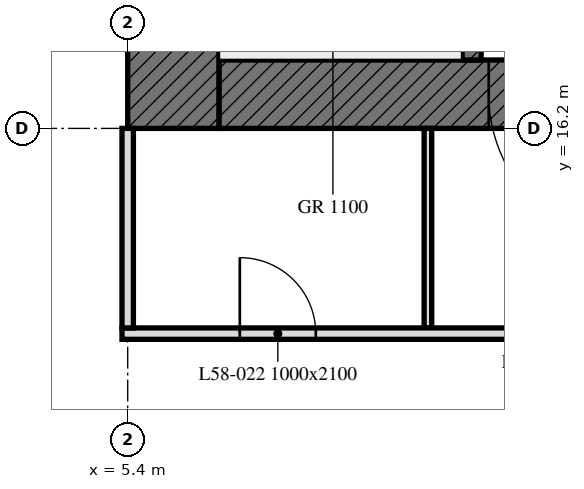
"""IFC4 building model, lengths in metres.
Left out: names, types, materials, properties, quantities, classifications, styles, units other than length and angle.
Written with IfcOpenShell. Run it as: python <this file> out.ifc"""

import sys

from ifc_helpers import new_model, si_unit, direction, frame, frame_2d, origin, place, context, subcontext, project, spatial, rectangle, extrude, element, fill, save


model = new_model("IFC4")
c1 = context("Model", 3, precision=1e-05, world=origin(), true_north=direction((0.0, 1.0)))
c2 = subcontext(c1, "Body", "Model", "MODEL_VIEW")
j1 = project(units=[si_unit("LENGTHUNIT", "METRE"), si_unit("PLANEANGLEUNIT", "RADIAN")], contexts=[c1])
p1 = place(None, origin())
s1 = spatial("IfcSite", under=j1, at=p1, CompositionType="ELEMENT")
p2 = place(p1, origin())
s2 = spatial("IfcBuilding", under=s1, at=p2, CompositionType="ELEMENT")
p3 = place(p2, frame((0.0, 0.0, 230.2)))
s3 = spatial("IfcBuildingStorey", under=s2, at=p3, CompositionType="ELEMENT", Elevation=230.2)
p4 = place(p3, frame((17.7, 16.65, 0.0), z_axis=(0.0, 0.0, 1.0), x_axis=(-1.0, 0.0, 0.0)))
e1 = element("IfcWall", 1, at=p4, inside=s3, PredefinedType="SOLIDWALL", context=c2, shape_type="SweptSolid", body=[
    extrude(rectangle(XDim=11.1, YDim=0.9, at=frame_2d((5.55, 0.0))), origin(), (0.0, 0.0, 1.0), 2.8),
])
p5 = place(p4, frame((5.55, 0.0, 0.0)))
e2 = element("IfcOpeningElement", 2, at=p5, cuts=e1, PredefinedType="OPENING", context=c2, shape_type="SweptSolid", body=[
    extrude(rectangle(XDim=2.0, YDim=2.4, at=frame_2d((1.0, 1.2))), frame((0.0, 0.45, 0.0), z_axis=(0.0, -1.0, 0.0), x_axis=(1.0, 0.0, 0.0)), (0.0, 0.0, 1.0), 0.9),
])
p6 = place(p3, frame((6.0, 16.2, 0.0), z_axis=(0.0, 0.0, 1.0), x_axis=(0.0, 1.0, 0.0)))
e3 = element("IfcWall", 3, at=p6, inside=s3, PredefinedType="SOLIDWALL", context=c2, shape_type="SweptSolid", body=[
    extrude(rectangle(XDim=16.2, YDim=1.2, at=frame_2d((8.1, 0.0))), origin(), (0.0, 0.0, 1.0), 2.8),
])
p7 = place(p3, frame((9.925, 17.1, 0.0), z_axis=(0.0, 0.0, 1.0), x_axis=(0.0, 1.0, 0.0)))
e4 = element("IfcWall", 4, at=p7, inside=s3, PredefinedType="SOLIDWALL", context=c2, shape_type="SweptSolid", body=[
    extrude(rectangle(XDim=14.4, YDim=0.25, at=frame_2d((7.2, 0.0))), origin(), (0.0, 0.0, 1.0), 2.8),
])
p8 = place(p7, frame((4.6, 0.0, 0.0)))
e5 = element("IfcOpeningElement", 5, at=p8, cuts=e4, PredefinedType="OPENING", context=c2, shape_type="SweptSolid", body=[
    extrude(rectangle(XDim=1.0, YDim=2.1, at=frame_2d((0.5, 1.05))), frame((0.0, 0.125, 0.0), z_axis=(0.0, -1.0, 0.0), x_axis=(1.0, 0.0, 0.0)), (0.0, 0.0, 1.0), 0.25),
])
p9 = place(p7, frame((7.062, 0.0, 0.0)))
e6 = element("IfcOpeningElement", 6, at=p9, cuts=e4, PredefinedType="OPENING", context=c2, shape_type="SweptSolid", body=[
    extrude(rectangle(XDim=1.2, YDim=2.1, at=frame_2d((0.6, 1.05))), frame((0.0, 0.125, 0.0), z_axis=(0.0, -1.0, 0.0), x_axis=(1.0, 0.0, 0.0)), (0.0, 0.0, 1.0), 0.25),
])
p10 = place(p7, frame((10.106, 0.0, 0.0)))
e7 = element("IfcOpeningElement", 7, at=p10, cuts=e4, PredefinedType="OPENING", context=c2, shape_type="SweptSolid", body=[
    extrude(rectangle(XDim=0.9, YDim=2.1, at=frame_2d((0.45, 1.05))), frame((0.0, 0.125, 0.0), z_axis=(0.0, -1.0, 0.0), x_axis=(1.0, 0.0, 0.0)), (0.0, 0.0, 1.0), 0.25),
])
p11 = place(p7, frame((12.048, 0.0, 0.0)))
e8 = element("IfcOpeningElement", 8, at=p11, cuts=e4, PredefinedType="OPENING", context=c2, shape_type="SweptSolid", body=[
    extrude(rectangle(XDim=0.9, YDim=2.1, at=frame_2d((0.45, 1.05))), frame((0.0, 0.125, 0.0), z_axis=(0.0, -1.0, 0.0), x_axis=(1.0, 0.0, 0.0)), (0.0, 0.0, 1.0), 0.25),
])
p12 = place(p7, frame((13.354, 0.0, 0.0)))
e9 = element("IfcOpeningElement", 9, at=p12, cuts=e4, PredefinedType="OPENING", context=c2, shape_type="SweptSolid", body=[
    extrude(rectangle(XDim=0.9, YDim=2.1, at=frame_2d((0.45, 1.05))), frame((0.0, 0.125, 0.0), z_axis=(0.0, -1.0, 0.0), x_axis=(1.0, 0.0, 0.0)), (0.0, 0.0, 1.0), 0.25),
])
p13 = place(p3, frame((9.35, 16.2, 0.0), z_axis=(0.0, 0.0, 1.0), x_axis=(0.0, -1.0, 0.0)))
e10 = element("IfcWall", 10, at=p13, inside=s3, PredefinedType="PARTITIONING", context=c2, shape_type="SweptSolid", body=[
    extrude(rectangle(XDim=2.625, YDim=0.1, at=frame_2d((1.312, 0.0))), origin(), (0.0, 0.0, 1.0), 2.8),
])
p14 = place(p3, frame((5.325, 13.5, 0.0), z_axis=(0.0, 0.0, 1.0), x_axis=(1.0, 0.0, 0.0)))
e11 = element("IfcWall", 11, at=p14, inside=s3, PredefinedType="PARTITIONING", context=c2, shape_type="SweptSolid", body=[
    extrude(rectangle(XDim=37.124, YDim=0.15, at=frame_2d((18.562, 0.0))), origin(), (0.0, 0.0, 1.0), 2.2),
])
p15 = place(p14, frame((18.475, 0.0, 0.0)))
e12 = element("IfcOpeningElement", 12, at=p15, cuts=e11, PredefinedType="OPENING", context=c2, shape_type="SweptSolid", body=[
    extrude(rectangle(XDim=1.0, YDim=2.1, at=frame_2d((0.5, 1.05))), frame((0.0, 0.075, 0.0), z_axis=(0.0, -1.0, 0.0), x_axis=(1.0, 0.0, 0.0)), (0.0, 0.0, 1.0), 0.15),
])
p16 = place(p14, frame((34.095, 0.0, 0.0)))
e13 = element("IfcOpeningElement", 13, at=p16, cuts=e11, PredefinedType="OPENING", context=c2, shape_type="SweptSolid", body=[
    extrude(rectangle(XDim=1.0, YDim=2.1, at=frame_2d((0.5, 1.05))), frame((0.0, 0.075, 0.0), z_axis=(0.0, -1.0, 0.0), x_axis=(1.0, 0.0, 0.0)), (0.0, 0.0, 1.0), 0.15),
])
p17 = place(p14, frame((8.75, 0.0, 0.0)))
e14 = element("IfcOpeningElement", 14, at=p17, cuts=e11, PredefinedType="OPENING", context=c2, shape_type="SweptSolid", body=[
    extrude(rectangle(XDim=1.0, YDim=2.1, at=frame_2d((0.5, 1.05))), frame((0.0, 0.075, 0.0), z_axis=(0.0, -1.0, 0.0), x_axis=(1.0, 0.0, 0.0)), (0.0, 0.0, 1.0), 0.15),
])
p18 = place(p14, frame((1.55, 0.0, 0.0)))
e15 = element("IfcOpeningElement", 15, at=p18, cuts=e11, PredefinedType="OPENING", context=c2, shape_type="SweptSolid", body=[
    extrude(rectangle(XDim=1.0, YDim=2.1, at=frame_2d((0.5, 1.05))), frame((0.0, 0.075, 0.0), z_axis=(0.0, -1.0, 0.0), x_axis=(1.0, 0.0, 0.0)), (0.0, 0.0, 1.0), 0.15),
])
p19 = place(p14, frame((28.2, 0.0, 0.0)))
e16 = element("IfcOpeningElement", 16, at=p19, cuts=e11, PredefinedType="OPENING", context=c2, shape_type="SweptSolid", body=[
    extrude(rectangle(XDim=1.0, YDim=2.1, at=frame_2d((0.5, 1.05))), frame((0.0, 0.075, 0.0), z_axis=(0.0, -1.0, 0.0), x_axis=(1.0, 0.0, 0.0)), (0.0, 0.0, 1.0), 0.15),
])
p20 = place(p14, frame((30.625, 0.0, 0.0)))
e17 = element("IfcOpeningElement", 17, at=p20, cuts=e11, PredefinedType="OPENING", context=c2, shape_type="SweptSolid", body=[
    extrude(rectangle(XDim=1.8, YDim=2.4, at=frame_2d((0.9, 1.2))), frame((0.0, 0.075, 0.0), z_axis=(0.0, -1.0, 0.0), x_axis=(1.0, 0.0, 0.0)), (0.0, 0.0, 1.0), 0.15),
])
p21 = place(p14, frame((5.925, 0.0, 0.0)))
e18 = element("IfcOpeningElement", 18, at=p21, cuts=e11, PredefinedType="OPENING", context=c2, shape_type="SweptSolid", body=[
    extrude(rectangle(XDim=1.0, YDim=2.1, at=frame_2d((0.5, 1.05))), frame((0.0, 0.075, 0.0), z_axis=(0.0, -1.0, 0.0), x_axis=(1.0, 0.0, 0.0)), (0.0, 0.0, 1.0), 0.15),
])
p22 = place(p3, frame((5.4, 13.575, 0.0), z_axis=(0.0, 0.0, 1.0), x_axis=(0.0, 1.0, 0.0)))
e19 = element("IfcWall", 19, at=p22, inside=s3, PredefinedType="PARTITIONING", context=c2, shape_type="SweptSolid", body=[
    extrude(rectangle(XDim=2.625, YDim=0.15, at=frame_2d((1.312, 0.0))), origin(), (0.0, 0.0, 1.0), 2.8),
])
p23 = place(p5, origin())
e20 = element("IfcDoor", 20, at=p23, inside=s3, OperationType="DOUBLE_DOOR_SINGLE_SWING", PredefinedType="DOOR", context=c2, shape_type="SweptSolid", body=[
    extrude(rectangle(XDim=2.0, YDim=2.4, at=frame_2d((1.0, 1.2))), frame((0.0, 0.025, 0.0), z_axis=(0.0, -1.0, 0.0), x_axis=(1.0, 0.0, 0.0)), (0.0, 0.0, 1.0), 0.05),
])
fill(e2, e20)
p24 = place(p18, origin())
e21 = element("IfcDoor", 21, at=p24, inside=s3, OperationType="SINGLE_SWING_RIGHT", PredefinedType="DOOR", context=c2, shape_type="SweptSolid", body=[
    extrude(rectangle(XDim=1.0, YDim=2.1, at=frame_2d((0.5, 1.05))), frame((0.0, 0.025, 0.0), z_axis=(0.0, -1.0, 0.0), x_axis=(1.0, 0.0, 0.0)), (0.0, 0.0, 1.0), 0.05),
])
fill(e15, e21)
save(model, sys.argv[1])
